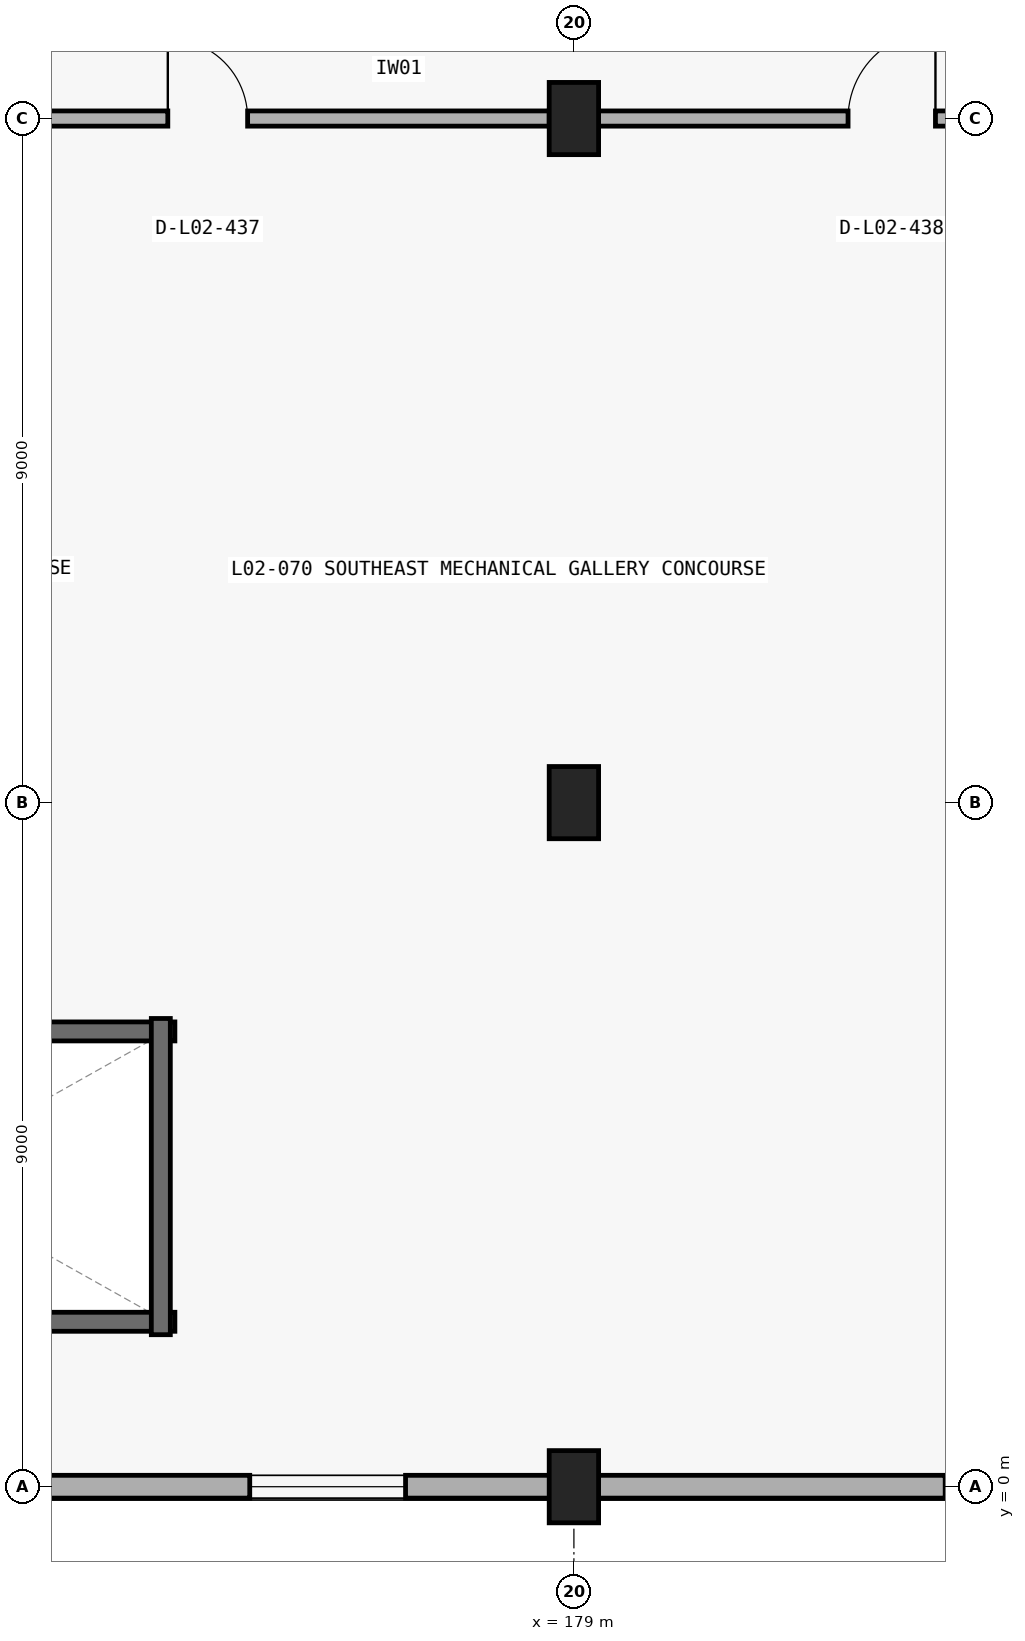
"""IFC4 building model, lengths in metres.
Left out: names, types, materials, properties, quantities, classifications, styles, units other than length and angle.
Written with IfcOpenShell. Run it as: python <this file> out.ifc"""

import sys

from ifc_helpers import new_model, si_unit, direction, frame, frame_2d, origin, origin_2d, place, context, subcontext, project, spatial, rectangle, extrude, element, fill, save


model = new_model("IFC4")
c1 = context("Model", 3, precision=1e-05, world=origin(), true_north=direction((0.0, 1.0)))
c2 = subcontext(c1, "Body", "Model", "MODEL_VIEW")
j1 = project(units=[si_unit("LENGTHUNIT", "METRE"), si_unit("PLANEANGLEUNIT", "RADIAN")], contexts=[c1])
p1 = place(None, origin())
s1 = spatial("IfcSite", under=j1, at=p1, CompositionType="ELEMENT")
p2 = place(p1, origin())
s2 = spatial("IfcBuilding", under=s1, at=p2, CompositionType="ELEMENT")
p3 = place(p2, frame((0.0, 0.0, 10.2)))
s3 = spatial("IfcBuildingStorey", under=s2, at=p3, CompositionType="ELEMENT", Elevation=10.2)
for number, where, z_axis, x_axis in (
    (1, (179.0, 0.0, 0.0), (0.0, 0.0, 1.0), (1.0, 0.0, 0.0)),
    (2, (179.0, 9.0, 0.0), (0.0, 0.0, 1.0), (1.0, 0.0, 0.0)),
    (3, (179.0, 18.0, 0.0), (0.0, 0.0, 1.0), (1.0, 0.0, 0.0)),
):
    element("IfcColumn", number, at=place(p3, frame(where, z_axis=z_axis, x_axis=x_axis)), inside=s3, PredefinedType="COLUMN", context=c2, shape_type="SweptSolid", body=[
        extrude(rectangle(XDim=0.65, YDim=0.95, at=origin_2d()), origin(), (0.0, 0.0, 1.0), 4.8),
    ])
p4 = place(p3, frame((187.7, 0.0, 0.0), z_axis=(0.0, 0.0, 1.0), x_axis=(-1.0, 0.0, 0.0)))
e4 = element("IfcWall", 4, at=p4, inside=s3, PredefinedType="STANDARD", context=c2, shape_type="SweptSolid", body=[
    extrude(rectangle(XDim=8.4, YDim=0.3, at=frame_2d((4.2, 0.0))), origin(), (0.0, 0.0, 1.0), 3.855),
])
p5 = place(p4, frame((2.065, 0.0, 0.95)))
e5 = element("IfcOpeningElement", 5, at=p5, cuts=e4, PredefinedType="OPENING", context=c2, shape_type="SweptSolid", body=[
    extrude(rectangle(XDim=1.75, YDim=2.1, at=frame_2d((0.875, 1.05))), frame((0.0, 0.16, 0.0), z_axis=(0.0, -1.0, 0.0), x_axis=(1.0, 0.0, 0.0)), (0.0, 0.0, 1.0), 0.32),
])
p6 = place(p3, frame((178.7, 0.0, 0.0), z_axis=(0.0, 0.0, 1.0), x_axis=(-1.0, 0.0, 0.0)))
e6 = element("IfcWall", 6, at=p6, inside=s3, PredefinedType="STANDARD", context=c2, shape_type="SweptSolid", body=[
    extrude(rectangle(XDim=8.4, YDim=0.3, at=frame_2d((4.2, 0.0))), origin(), (0.0, 0.0, 1.0), 3.855),
])
p7 = place(p6, frame((1.915, 0.0, 0.95)))
e7 = element("IfcOpeningElement", 7, at=p7, cuts=e6, PredefinedType="OPENING", context=c2, shape_type="SweptSolid", body=[
    extrude(rectangle(XDim=2.05, YDim=2.2, at=frame_2d((1.025, 1.1))), frame((0.0, 0.16, 0.0), z_axis=(0.0, -1.0, 0.0), x_axis=(1.0, 0.0, 0.0)), (0.0, 0.0, 1.0), 0.32),
])
for number, where, z_axis, x_axis in (
    (8, (164.25, 2.17, 0.0), (0.0, 0.0, 1.0), (1.0, 0.0, 0.0)),
    (9, (173.75, 5.99, 0.0), (0.0, 0.0, 1.0), (-1.0, 0.0, 0.0)),
):
    element("IfcWall", number, at=place(p3, frame(where, z_axis=z_axis, x_axis=x_axis)), inside=s3, PredefinedType="SHEAR", context=c2, shape_type="SweptSolid", body=[
        extrude(rectangle(XDim=9.5, YDim=0.25, at=frame_2d((4.75, 0.0))), origin(), (0.0, 0.0, 1.0), 4.5),
    ])
p8 = place(p3, frame((173.565, 2.0, 0.0), z_axis=(0.0, 0.0, 1.0), x_axis=(0.0, 1.0, 0.0)))
e10 = element("IfcWall", 10, at=p8, inside=s3, PredefinedType="SHEAR", context=c2, shape_type="SweptSolid", body=[
    extrude(rectangle(XDim=4.16, YDim=0.25, at=frame_2d((2.08, 0.0))), origin(), (0.0, 0.0, 1.0), 4.5),
])
p9 = place(p3, frame((169.675, 18.0, 0.0), z_axis=(0.0, 0.0, 1.0), x_axis=(1.0, 0.0, 0.0)))
e11 = element("IfcWall", 11, at=p9, inside=s3, PredefinedType="PARTITIONING", context=c2, shape_type="SweptSolid", body=[
    extrude(rectangle(XDim=9.015, YDim=0.2, at=frame_2d((4.507, 0.0))), origin(), (0.0, 0.0, 1.0), 3.855),
])
p10 = place(p9, frame((3.982, 0.0, 0.0)))
e12 = element("IfcOpeningElement", 12, at=p10, cuts=e11, PredefinedType="OPENING", context=c2, shape_type="SweptSolid", body=[
    extrude(rectangle(XDim=1.05, YDim=2.15, at=frame_2d((0.525, 1.075))), frame((0.0, 0.11, 0.0), z_axis=(0.0, -1.0, 0.0), x_axis=(1.0, 0.0, 0.0)), (0.0, 0.0, 1.0), 0.22),
])
p11 = place(p3, frame((178.675, 18.0, 0.0), z_axis=(0.0, 0.0, 1.0), x_axis=(1.0, 0.0, 0.0)))
e13 = element("IfcWall", 13, at=p11, inside=s3, PredefinedType="PARTITIONING", context=c2, shape_type="SweptSolid", body=[
    extrude(rectangle(XDim=9.015, YDim=0.2, at=frame_2d((4.507, 0.0))), origin(), (0.0, 0.0, 1.0), 3.855),
])
p12 = place(p11, frame((3.932, 0.0, 0.0)))
e14 = element("IfcOpeningElement", 14, at=p12, cuts=e13, PredefinedType="OPENING", context=c2, shape_type="SweptSolid", body=[
    extrude(rectangle(XDim=1.15, YDim=2.2, at=frame_2d((0.575, 1.1))), frame((0.0, 0.11, 0.0), z_axis=(0.0, -1.0, 0.0), x_axis=(1.0, 0.0, 0.0)), (0.0, 0.0, 1.0), 0.22),
])
p13 = place(p7, origin())
e15 = element("IfcWindow", 15, at=p13, inside=s3, PartitioningType="SINGLE_PANEL", PredefinedType="WINDOW", context=c2, shape_type="SweptSolid", body=[
    extrude(rectangle(XDim=2.05, YDim=2.2, at=frame_2d((1.025, 1.1))), frame((0.0, 0.03, 0.0), z_axis=(0.0, -1.0, 0.0), x_axis=(1.0, 0.0, 0.0)), (0.0, 0.0, 1.0), 0.06),
])
fill(e7, e15)
p14 = place(p10, origin())
e16 = element("IfcDoor", 16, at=p14, inside=s3, OperationType="SINGLE_SWING_LEFT", PredefinedType="DOOR", context=c2, shape_type="SweptSolid", body=[
    extrude(rectangle(XDim=1.05, YDim=2.15, at=frame_2d((0.525, 1.075))), frame((0.0, 0.025, 0.0), z_axis=(0.0, -1.0, 0.0), x_axis=(1.0, 0.0, 0.0)), (0.0, 0.0, 1.0), 0.05),
])
fill(e12, e16)
p15 = place(p12, origin())
e17 = element("IfcDoor", 17, at=p15, inside=s3, OperationType="SINGLE_SWING_RIGHT", PredefinedType="DOOR", context=c2, shape_type="SweptSolid", body=[
    extrude(rectangle(XDim=1.15, YDim=2.2, at=frame_2d((0.575, 1.1))), frame((0.0, 0.025, 0.0), z_axis=(0.0, -1.0, 0.0), x_axis=(1.0, 0.0, 0.0)), (0.0, 0.0, 1.0), 0.05),
])
fill(e14, e17)
save(model, sys.argv[1])
